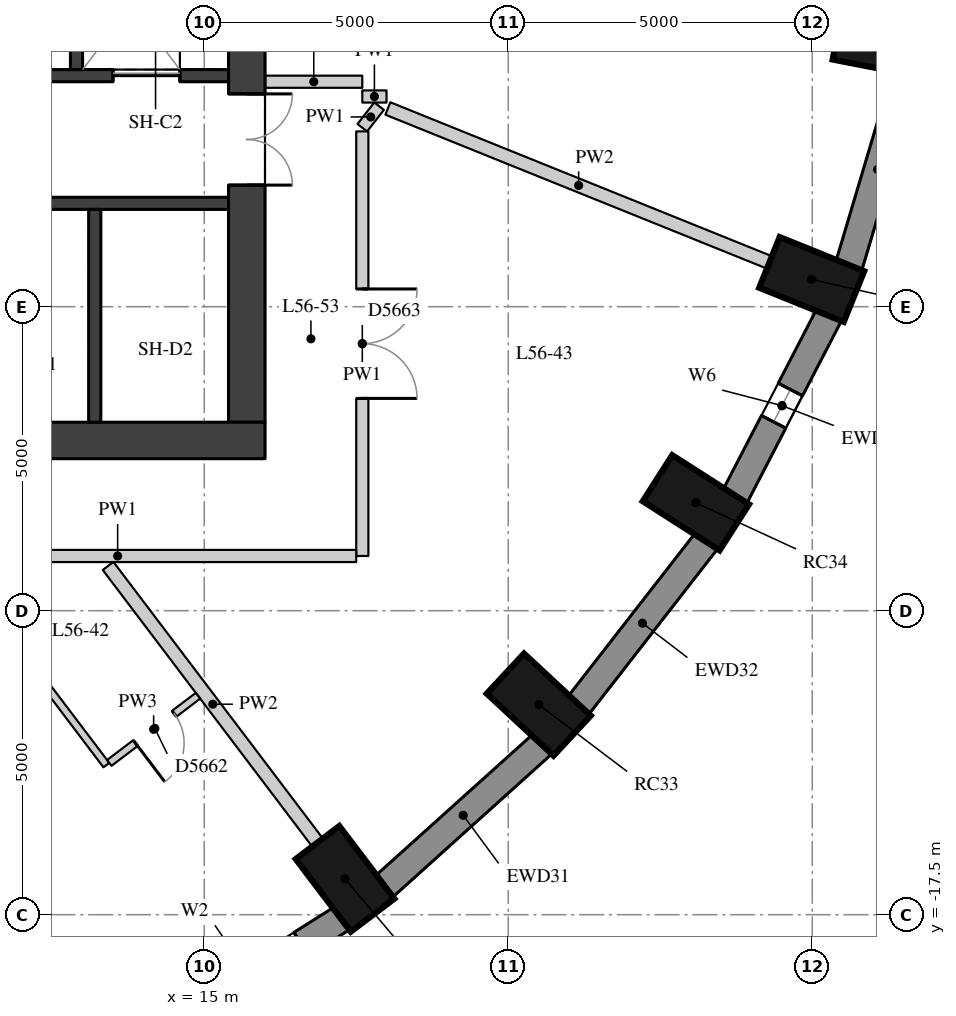
"""IFC4 building model, lengths in metres.
Left out: names, types, materials, properties, quantities, classifications, styles, units other than length and angle.
Written with IfcOpenShell. Run it as: python <this file> out.ifc"""

import sys

from ifc_helpers import new_model, si_unit, direction, frame, frame_2d, origin, origin_2d, place, context, subcontext, project, spatial, rectangle, extrude, element, fill, save


model = new_model("IFC4")
c1 = context("Model", 3, precision=1e-05, world=origin(), true_north=direction((0.0, 1.0)))
c2 = subcontext(c1, "Body", "Model", "MODEL_VIEW")
j1 = project(units=[si_unit("LENGTHUNIT", "METRE"), si_unit("PLANEANGLEUNIT", "RADIAN")], contexts=[c1])
p1 = place(None, origin())
s1 = spatial("IfcSite", under=j1, at=p1, CompositionType="ELEMENT")
p2 = place(p1, origin())
s2 = spatial("IfcBuilding", under=s1, at=p2, CompositionType="ELEMENT")
p3 = place(p2, frame((0.0, 0.0, 199.1)))
s3 = spatial("IfcBuildingStorey", under=s2, at=p3, CompositionType="ELEMENT", Elevation=199.1)
for number, where, z_axis, x_axis in (
    (1, (17.316, -16.911, 0.0), (0.0, 0.0, 1.0), (0.604, -0.797, 0.0)),
    (2, (20.502, -14.045, 0.0), (0.0, 0.0, 1.0), (0.732, -0.681, 0.0)),
    (3, (23.087, -10.725, 0.0), (0.0, 0.0, 1.0), (0.842, -0.539, 0.0)),
    (4, (24.991, -7.052, 0.0), (0.0, 0.0, 1.0), (0.927, -0.374, 0.0)),
    (5, (26.157, -3.137, 0.0), (0.0, 0.0, 1.0), (0.981, -0.192, 0.0)),
):
    element("IfcColumn", number, at=place(p3, frame(where, z_axis=z_axis, x_axis=x_axis)), inside=s3, PredefinedType="COLUMN", context=c2, shape_type="SweptSolid", body=[
        extrude(rectangle(XDim=1.5, YDim=0.9, at=origin_2d()), origin(), (0.0, 0.0, 1.0), 3.3),
    ])
p4 = place(p3, frame((14.232, -19.47, 0.0), z_axis=(0.0, 0.0, 1.0), x_axis=(0.84614984472, 0.532945063098, 0.0)))
e6 = element("IfcWall", 6, at=p4, inside=s3, PredefinedType="SOLIDWALL", context=c2, shape_type="SweptSolid", body=[
    extrude(rectangle(XDim=3.586, YDim=0.45, at=frame_2d((1.793, 0.0))), origin(), (0.0, 0.0, 1.0), 3.02),
])
p5 = place(p4, frame((0.793, 0.0, 0.4)))
e7 = element("IfcOpeningElement", 7, at=p5, cuts=e6, PredefinedType="OPENING", context=c2, shape_type="SweptSolid", body=[
    extrude(rectangle(XDim=2.0, YDim=1.75, at=frame_2d((1.0, 0.875))), frame((0.0, 0.235, 0.0), z_axis=(0.0, -1.0, 0.0), x_axis=(1.0, 0.0, 0.0)), (0.0, 0.0, 1.0), 0.47),
])
p6 = place(p3, frame((17.953, -17.04, 0.0), z_axis=(0.0, 0.0, 1.0), x_axis=(0.743442727602, 0.668799604348, 0.0)))
e8 = element("IfcWall", 8, at=p6, inside=s3, PredefinedType="SOLIDWALL", context=c2, shape_type="SweptSolid", body=[
    extrude(rectangle(XDim=3.513, YDim=0.45, at=frame_2d((1.756, 0.0))), origin(), (0.0, 0.0, 1.0), 3.02),
])
p7 = place(p3, frame((21.151, -14.061, 0.0), z_axis=(0.0, 0.0, 1.0), x_axis=(0.614255239631, 0.789107407509, 0.0)))
e9 = element("IfcWall", 9, at=p7, inside=s3, PredefinedType="SOLIDWALL", context=c2, shape_type="SweptSolid", body=[
    extrude(rectangle(XDim=3.438, YDim=0.45, at=frame_2d((1.719, 0.0))), origin(), (0.0, 0.0, 1.0), 3.02),
])
p8 = place(p3, frame((23.727, -10.624, 0.0), z_axis=(0.0, 0.0, 1.0), x_axis=(0.460175500475, 0.887827972505, 0.0)))
e10 = element("IfcWall", 10, at=p8, inside=s3, PredefinedType="SOLIDWALL", context=c2, shape_type="SweptSolid", body=[
    extrude(rectangle(XDim=3.371, YDim=0.45, at=frame_2d((1.685, 0.0))), origin(), (0.0, 0.0, 1.0), 3.02),
])
p9 = place(p8, frame((1.385, 0.0, 0.4)))
e11 = element("IfcOpeningElement", 11, at=p9, cuts=e10, PredefinedType="OPENING", context=c2, shape_type="SweptSolid", body=[
    extrude(rectangle(XDim=0.6, YDim=1.75, at=frame_2d((0.3, 0.875))), frame((0.0, 0.235, 0.0), z_axis=(0.0, -1.0, 0.0), x_axis=(1.0, 0.0, 0.0)), (0.0, 0.0, 1.0), 0.47),
])
p10 = place(p3, frame((25.6, -6.834, 0.0), z_axis=(0.0, 0.0, 1.0), x_axis=(0.285444972963, 0.958395099847, 0.0)))
e12 = element("IfcWall", 12, at=p10, inside=s3, PredefinedType="SOLIDWALL", context=c2, shape_type="SweptSolid", body=[
    extrude(rectangle(XDim=3.32, YDim=0.45, at=frame_2d((1.66, 0.0))), origin(), (0.0, 0.0, 1.0), 3.02),
])
p11 = place(p3, frame((15.7, -9.4, 0.0), z_axis=(0.0, 0.0, 1.0), x_axis=(0.0, 1.0, 0.0)))
e13 = element("IfcWall", 13, at=p11, inside=s3, PredefinedType="SHEAR", context=c2, shape_type="SweptSolid", body=[
    extrude(rectangle(XDim=18.8, YDim=0.6, at=frame_2d((9.4, 0.0))), origin(), (0.0, 0.0, 1.0), 3.02),
])
p12 = place(p11, frame((13.4, 0.0, 0.0)))
e14 = element("IfcOpeningElement", 14, at=p12, cuts=e13, PredefinedType="OPENING", context=c2, shape_type="SweptSolid", body=[
    extrude(rectangle(XDim=1.5, YDim=2.1, at=frame_2d((0.75, 1.05))), frame((0.0, 0.31, 0.0), z_axis=(0.0, -1.0, 0.0), x_axis=(1.0, 0.0, 0.0)), (0.0, 0.0, 1.0), 0.62),
])
p13 = place(p11, frame((3.9, 0.0, 0.0)))
e15 = element("IfcOpeningElement", 15, at=p13, cuts=e13, PredefinedType="OPENING", context=c2, shape_type="SweptSolid", body=[
    extrude(rectangle(XDim=1.5, YDim=2.1, at=frame_2d((0.75, 1.05))), frame((0.0, 0.31, 0.0), z_axis=(0.0, -1.0, 0.0), x_axis=(1.0, 0.0, 0.0)), (0.0, 0.0, 1.0), 0.62),
])
p14 = place(p3, frame((4.0, -9.7, 0.0), z_axis=(0.0, 0.0, 1.0), x_axis=(1.0, 0.0, 0.0)))
e16 = element("IfcWall", 16, at=p14, inside=s3, PredefinedType="SHEAR", context=c2, shape_type="SweptSolid", body=[
    extrude(rectangle(XDim=12.0, YDim=0.6, at=frame_2d((6.0, 0.0))), origin(), (0.0, 0.0, 1.0), 3.02),
])
p15 = place(p3, frame((4.6, -3.7, 0.0), z_axis=(0.0, 0.0, 1.0), x_axis=(1.0, 0.0, 0.0)))
e17 = element("IfcWall", 17, at=p15, inside=s3, PredefinedType="SHEAR", context=c2, shape_type="SweptSolid", body=[
    extrude(rectangle(XDim=10.8, YDim=0.2, at=frame_2d((5.4, 0.0))), origin(), (0.0, 0.0, 1.0), 3.02),
])
p16 = place(p15, frame((6.6, 0.0, 0.0)))
e18 = element("IfcOpeningElement", 18, at=p16, cuts=e17, PredefinedType="OPENING", context=c2, shape_type="SweptSolid", body=[
    extrude(rectangle(XDim=1.1, YDim=2.1, at=frame_2d((0.55, 1.05))), frame((0.0, 0.11, 0.0), z_axis=(0.0, -1.0, 0.0), x_axis=(1.0, 0.0, 0.0)), (0.0, 0.0, 1.0), 0.22),
])
p17 = place(p15, frame((8.9, 0.0, 0.0)))
e19 = element("IfcOpeningElement", 19, at=p17, cuts=e17, PredefinedType="OPENING", context=c2, shape_type="SweptSolid", body=[
    extrude(rectangle(XDim=1.1, YDim=2.1, at=frame_2d((0.55, 1.05))), frame((0.0, 0.11, 0.0), z_axis=(0.0, -1.0, 0.0), x_axis=(1.0, 0.0, 0.0)), (0.0, 0.0, 1.0), 0.22),
])
p18 = place(p3, frame((4.6, -5.8, 0.0), z_axis=(0.0, 0.0, 1.0), x_axis=(1.0, 0.0, 0.0)))
e20 = element("IfcWall", 20, at=p18, inside=s3, PredefinedType="SHEAR", context=c2, shape_type="SweptSolid", body=[
    extrude(rectangle(XDim=10.8, YDim=0.2, at=frame_2d((5.4, 0.0))), origin(), (0.0, 0.0, 1.0), 3.02),
])
p19 = place(p3, frame((13.2, -9.4, 0.0), z_axis=(0.0, 0.0, 1.0), x_axis=(0.0, 1.0, 0.0)))
e21 = element("IfcWall", 21, at=p19, inside=s3, PredefinedType="SHEAR", context=c2, shape_type="SweptSolid", body=[
    extrude(rectangle(XDim=3.5, YDim=0.2, at=frame_2d((1.75, 0.0))), origin(), (0.0, 0.0, 1.0), 3.02),
])
p20 = place(p3, frame((12.9, -3.6, 0.0), z_axis=(0.0, 0.0, 1.0), x_axis=(0.0, 1.0, 0.0)))
e22 = element("IfcWall", 22, at=p20, inside=s3, PredefinedType="SHEAR", context=c2, shape_type="SweptSolid", body=[
    extrude(rectangle(XDim=2.5, YDim=0.2, at=frame_2d((1.25, 0.0))), origin(), (0.0, 0.0, 1.0), 3.02),
])
p21 = place(p3, frame((17.6, -4.043, 0.0), z_axis=(0.0, 0.0, 1.0), x_axis=(1.0, 0.0, 0.0)))
e23 = element("IfcWall", 23, at=p21, inside=s3, PredefinedType="PARTITIONING", context=c2, shape_type="SweptSolid", body=[
    extrude(rectangle(XDim=0.398, YDim=0.2, at=frame_2d((0.199, 0.0))), origin(), (0.0, 0.0, 1.0), 3.02),
])
p22 = place(p3, frame((17.876, -4.201, 0.0), z_axis=(0.0, 0.0, 1.0), x_axis=(-0.61405326993, -0.789264582816, 0.0)))
e24 = element("IfcWall", 24, at=p22, inside=s3, PredefinedType="PARTITIONING", context=c2, shape_type="SweptSolid", body=[
    extrude(rectangle(XDim=0.45, YDim=0.2, at=frame_2d((0.225, 0.0))), origin(), (0.0, 0.0, 1.0), 3.02),
])
p23 = place(p3, frame((17.6, -4.617, 0.0), z_axis=(0.0, 0.0, 1.0), x_axis=(0.0, -1.0, 0.0)))
e25 = element("IfcWall", 25, at=p23, inside=s3, PredefinedType="PARTITIONING", context=c2, shape_type="SweptSolid", body=[
    extrude(rectangle(XDim=6.983, YDim=0.2, at=frame_2d((3.492, 0.0))), origin(), (0.0, 0.0, 1.0), 3.02),
])
p24 = place(p23, frame((2.592, 0.0, 0.0)))
e26 = element("IfcOpeningElement", 26, at=p24, cuts=e25, PredefinedType="OPENING", context=c2, shape_type="SweptSolid", body=[
    extrude(rectangle(XDim=1.8, YDim=2.1, at=frame_2d((0.9, 1.05))), frame((0.0, 0.11, 0.0), z_axis=(0.0, -1.0, 0.0), x_axis=(1.0, 0.0, 0.0)), (0.0, 0.0, 1.0), 0.22),
])
p25 = place(p3, frame((17.5, -11.6, 0.0), z_axis=(0.0, 0.0, 1.0), x_axis=(-1.0, 0.0, 0.0)))
e27 = element("IfcWall", 27, at=p25, inside=s3, PredefinedType="PARTITIONING", context=c2, shape_type="SweptSolid", body=[
    extrude(rectangle(XDim=7.847, YDim=0.2, at=frame_2d((3.923, 0.0))), origin(), (0.0, 0.0, 1.0), 3.02),
])
p26 = place(p3, frame((16.004, -3.8, 0.0), z_axis=(0.0, 0.0, 1.0), x_axis=(1.0, 0.0, 0.0)))
e28 = element("IfcWall", 28, at=p26, inside=s3, PredefinedType="PARTITIONING", context=c2, shape_type="SweptSolid", body=[
    extrude(rectangle(XDim=1.596, YDim=0.2, at=frame_2d((0.798, 0.0))), origin(), (0.0, 0.0, 1.0), 2.47),
])
p27 = place(p3, frame((16.863, -16.312, 0.0), z_axis=(0.0, 0.0, 1.0), x_axis=(-0.603636051313, 0.797260006243, 0.0)))
e29 = element("IfcWall", 29, at=p27, inside=s3, PredefinedType="PARTITIONING", context=c2, shape_type="SweptSolid", body=[
    extrude(rectangle(XDim=5.706, YDim=0.22, at=frame_2d((2.853, 0.0))), origin(), (0.0, 0.0, 1.0), 3.02),
])
p28 = place(p3, frame((24.295, -6.771, 0.0), z_axis=(0.0, 0.0, 1.0), x_axis=(-0.927382720906, 0.374114005305, 0.0)))
e30 = element("IfcWall", 30, at=p28, inside=s3, PredefinedType="PARTITIONING", context=c2, shape_type="SweptSolid", body=[
    extrude(rectangle(XDim=6.766, YDim=0.22, at=frame_2d((3.383, 0.0))), origin(), (0.0, 0.0, 1.0), 3.02),
])
p29 = place(p3, frame((10.887, -11.732, 0.0), z_axis=(0.0, 0.0, 1.0), x_axis=(0.603646932038, -0.797251767913, 0.0)))
e31 = element("IfcWall", 31, at=p29, inside=s3, PredefinedType="PARTITIONING", context=c2, shape_type="SweptSolid", body=[
    extrude(rectangle(XDim=4.149, YDim=0.12, at=frame_2d((2.074, 0.0))), origin(), (0.0, 0.0, 1.0), 3.02),
])
p30 = place(p3, frame((13.439, -15.003, 0.0), z_axis=(0.0, 0.0, 1.0), x_axis=(0.797238062708, 0.603665032422, 0.0)))
e32 = element("IfcWall", 32, at=p30, inside=s3, PredefinedType="PARTITIONING", context=c2, shape_type="SweptSolid", body=[
    extrude(rectangle(XDim=1.83, YDim=0.12, at=frame_2d((0.915, 0.0))), origin(), (0.0, 0.0, 1.0), 3.02),
])
p31 = place(p30, frame((0.54, 0.0, 0.0)))
e33 = element("IfcOpeningElement", 33, at=p31, cuts=e32, PredefinedType="OPENING", context=c2, shape_type="SweptSolid", body=[
    extrude(rectangle(XDim=0.8, YDim=2.1, at=frame_2d((0.4, 1.05))), frame((0.0, 0.07, 0.0), z_axis=(0.0, -1.0, 0.0), x_axis=(1.0, 0.0, 0.0)), (0.0, 0.0, 1.0), 0.14),
])
p32 = place(p9, origin())
e34 = element("IfcWindow", 34, at=p32, inside=s3, PartitioningType="SINGLE_PANEL", PredefinedType="WINDOW", context=c2, shape_type="SweptSolid", body=[
    extrude(rectangle(XDim=0.6, YDim=1.75, at=frame_2d((0.3, 0.875))), frame((0.0, 0.035, 0.0), z_axis=(0.0, -1.0, 0.0), x_axis=(1.0, 0.0, 0.0)), (0.0, 0.0, 1.0), 0.06),
])
fill(e11, e34)
p33 = place(p13, origin())
e35 = element("IfcDoor", 35, at=p33, inside=s3, OperationType="DOUBLE_DOOR_SINGLE_SWING", PredefinedType="DOOR", context=c2, shape_type="SweptSolid", body=[
    extrude(rectangle(XDim=1.5, YDim=2.1, at=frame_2d((0.75, 1.05))), frame((0.0, 0.025, 0.0), z_axis=(0.0, -1.0, 0.0), x_axis=(1.0, 0.0, 0.0)), (0.0, 0.0, 1.0), 0.05),
])
fill(e15, e35)
p34 = place(p17, origin())
e36 = element("IfcDoor", 36, at=p34, inside=s3, OperationType="DOUBLE_DOOR_SLIDING", PredefinedType="DOOR", context=c2, shape_type="SweptSolid", body=[
    extrude(rectangle(XDim=1.1, YDim=2.1, at=frame_2d((0.55, 1.05))), frame((0.0, 0.025, 0.0), z_axis=(0.0, -1.0, 0.0), x_axis=(1.0, 0.0, 0.0)), (0.0, 0.0, 1.0), 0.05),
])
fill(e19, e36)
p35 = place(p31, origin())
e37 = element("IfcDoor", 37, at=p35, inside=s3, OperationType="SINGLE_SWING_RIGHT", PredefinedType="DOOR", context=c2, shape_type="SweptSolid", body=[
    extrude(rectangle(XDim=0.8, YDim=2.1, at=frame_2d((0.4, 1.05))), frame((0.0, 0.025, 0.0), z_axis=(0.0, -1.0, 0.0), x_axis=(1.0, 0.0, 0.0)), (0.0, 0.0, 1.0), 0.05),
])
fill(e33, e37)
p36 = place(p24, origin())
e38 = element("IfcDoor", 38, at=p36, inside=s3, OperationType="DOUBLE_DOOR_SINGLE_SWING", PredefinedType="DOOR", context=c2, shape_type="SweptSolid", body=[
    extrude(rectangle(XDim=1.8, YDim=2.1, at=frame_2d((0.9, 1.05))), frame((0.0, 0.025, 0.0), z_axis=(0.0, -1.0, 0.0), x_axis=(1.0, 0.0, 0.0)), (0.0, 0.0, 1.0), 0.05),
])
fill(e26, e38)
save(model, sys.argv[1])
